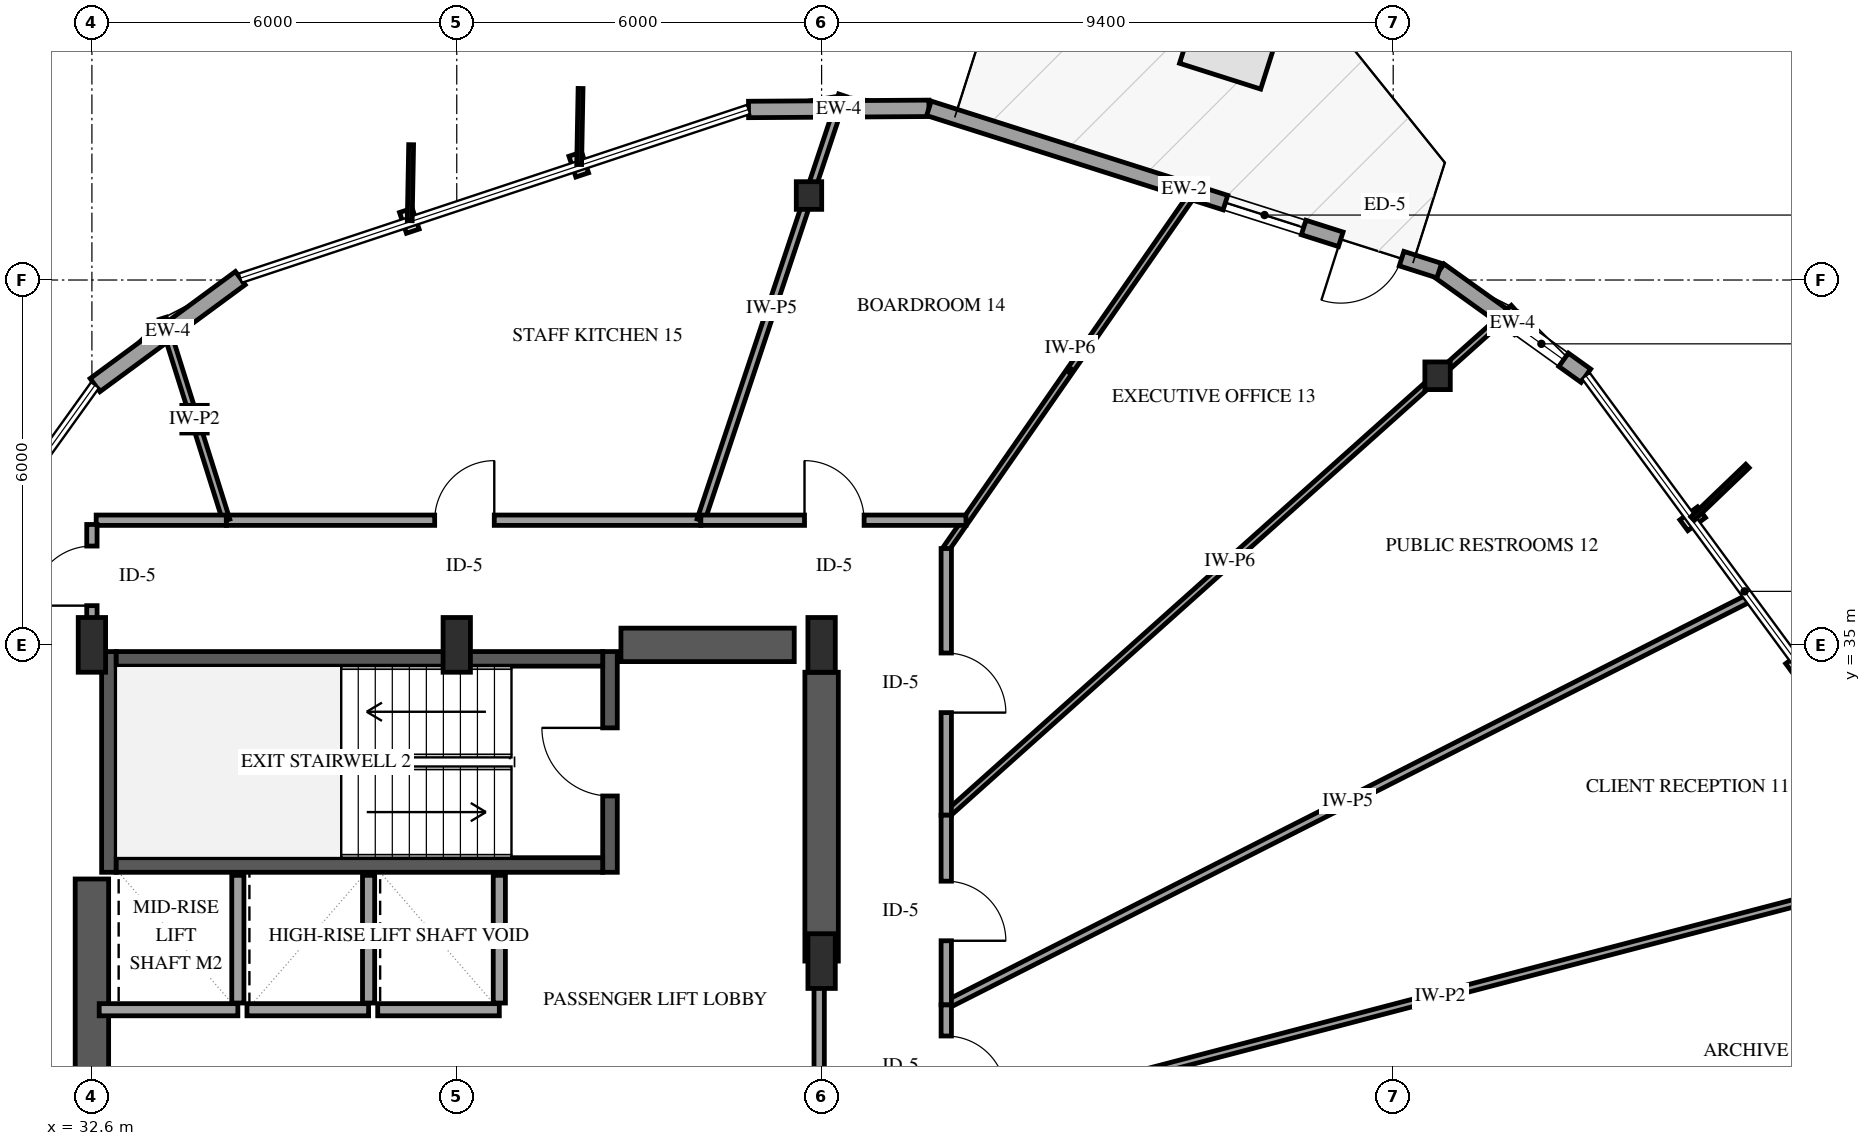
"""IFC4 building model, lengths in metres.
Left out: names, types, materials, properties, quantities, classifications, styles, units other than length and angle.
Written with IfcOpenShell. Run it as: python <this file> out.ifc"""

import sys

from ifc_helpers import new_model, si_unit, direction, frame, frame_2d, origin, origin_2d, place, context, subcontext, project, spatial, rectangle, i_section, extrude, element, fill, save


model = new_model("IFC4")
c1 = context("Model", 3, precision=1e-05, world=origin(), true_north=direction((0.0, 1.0)))
c2 = subcontext(c1, "Body", "Model", "MODEL_VIEW")
j1 = project(units=[si_unit("LENGTHUNIT", "METRE"), si_unit("PLANEANGLEUNIT", "RADIAN")], contexts=[c1])
p1 = place(None, origin())
s1 = spatial("IfcSite", under=j1, at=p1, CompositionType="ELEMENT")
p2 = place(p1, origin())
s2 = spatial("IfcBuilding", under=s1, at=p2, CompositionType="ELEMENT")
p3 = place(p2, frame((0.0, 0.0, 99.1)))
s3 = spatial("IfcBuildingStorey", under=s2, at=p3, CompositionType="ELEMENT", Elevation=99.1)
p4 = place(p3, frame((32.88, 31.26, 0.0), z_axis=(0.0, 0.0, 1.0), x_axis=(0.0, 1.0, 0.0)))
e1 = element("IfcWall", 1, at=p4, inside=s3, PredefinedType="SHEAR", context=c2, shape_type="SweptSolid", body=[
    extrude(rectangle(XDim=3.63, YDim=0.24, at=frame_2d((1.815, 0.0))), origin(), (0.0, 0.0, 1.0), 3.9),
])
p5 = place(p3, frame((41.12, 31.26, 0.0), z_axis=(0.0, 0.0, 1.0), x_axis=(0.0, 1.0, 0.0)))
e2 = element("IfcWall", 2, at=p5, inside=s3, PredefinedType="SHEAR", context=c2, shape_type="SweptSolid", body=[
    extrude(rectangle(XDim=3.63, YDim=0.24, at=frame_2d((1.815, 0.0))), origin(), (0.0, 0.0, 1.0), 3.9),
])
p6 = place(p5, frame((1.255, 0.0, 0.0)))
e3 = element("IfcOpeningElement", 3, at=p6, cuts=e2, PredefinedType="OPENING", context=c2, shape_type="SweptSolid", body=[
    extrude(rectangle(XDim=1.12, YDim=2.15, at=frame_2d((0.56, 1.075))), frame((0.0, 0.13, 0.0), z_axis=(0.0, -1.0, 0.0), x_axis=(1.0, 0.0, 0.0)), (0.0, 0.0, 1.0), 0.26),
])
for number, where, z_axis, x_axis in (
    (4, (33.0, 31.38, 0.0), (0.0, 0.0, 1.0), (1.0, 0.0, 0.0)),
    (5, (33.0, 34.77, 0.0), (0.0, 0.0, 1.0), (1.0, 0.0, 0.0)),
):
    element("IfcWall", number, at=place(p3, frame(where, z_axis=z_axis, x_axis=x_axis)), inside=s3, PredefinedType="SHEAR", context=c2, shape_type="SweptSolid", body=[
        extrude(rectangle(XDim=8.0, YDim=0.24, at=frame_2d((4.0, 0.0))), origin(), (0.0, 0.0, 1.0), 3.9),
    ])
p7 = place(p3, frame((32.6, 18.85, 0.0), z_axis=(0.0, 0.0, 1.0), x_axis=(0.0, 1.0, 0.0)))
e6 = element("IfcWall", 6, at=p7, inside=s3, PredefinedType="SHEAR", context=c2, shape_type="SweptSolid", body=[
    extrude(rectangle(XDim=12.3, YDim=0.55, at=frame_2d((6.15, 0.0))), origin(), (0.0, 0.0, 1.0), 3.9),
])
p8 = place(p3, frame((41.3, 35.0, 0.0), z_axis=(0.0, 0.0, 1.0), x_axis=(1.0, 0.0, 0.0)))
e7 = element("IfcWall", 7, at=p8, inside=s3, PredefinedType="SHEAR", context=c2, shape_type="SweptSolid", body=[
    extrude(rectangle(XDim=2.85, YDim=0.55, at=frame_2d((1.425, 0.0))), origin(), (0.0, 0.0, 1.0), 3.9),
])
p9 = place(p3, frame((44.6, 29.8, 0.0), z_axis=(0.0, 0.0, 1.0), x_axis=(0.0, 1.0, 0.0)))
e8 = element("IfcWall", 8, at=p9, inside=s3, PredefinedType="SHEAR", context=c2, shape_type="SweptSolid", body=[
    extrude(rectangle(XDim=4.75, YDim=0.55, at=frame_2d((2.375, 0.0))), origin(), (0.0, 0.0, 1.0), 3.9),
])
for number, where, z_axis, x_axis in (
    (9, (32.6, 35.0, 0.0), (0.0, 0.0, 1.0), (1.0, 0.0, 0.0)),
    (10, (38.6, 35.0, 0.0), (0.0, 0.0, 1.0), (1.0, 0.0, 0.0)),
    (11, (44.6, 29.8, 0.0), (0.0, 0.0, 1.0), (1.0, 0.0, 0.0)),
    (12, (44.6, 35.0, 0.0), (0.0, 0.0, 1.0), (1.0, 0.0, 0.0)),
):
    element("IfcColumn", number, at=place(p3, frame(where, z_axis=z_axis, x_axis=x_axis)), inside=s3, PredefinedType="PILASTER", context=c2, shape_type="SweptSolid", body=[
        extrude(rectangle(XDim=0.45, YDim=0.9, at=origin_2d()), origin(), (0.0, 0.0, 1.0), 3.9),
    ])
for number, where, z_axis, x_axis in (
    (13, (54.73, 39.425, 0.0), (0.0, 0.0, 1.0), (1.0, 0.0, 0.0)),
    (14, (44.393, 42.389, 0.0), (0.0, 0.0, 1.0), (1.0, 0.0, 0.0)),
    (15, (34.288, 38.711, 0.0), (0.0, 0.0, 1.0), (1.0, 0.0, 0.0)),
):
    element("IfcColumn", number, at=place(p3, frame(where, z_axis=z_axis, x_axis=x_axis)), inside=s3, PredefinedType="COLUMN", context=c2, shape_type="SweptSolid", body=[
        extrude(i_section(OverallWidth=0.418, OverallDepth=0.455, WebThickness=0.042, FlangeThickness=0.068, FilletRadius=0.038, at=origin_2d()), origin(), (0.0, 0.0, 1.0), 3.9),
    ])
p10 = place(p3, frame((57.168, 39.426, 0.0), z_axis=(0.0, 0.0, 1.0), x_axis=(-0.81270345811, 0.582677517308, 0.0)))
e16 = element("IfcWall", 16, at=p10, inside=s3, PredefinedType="SOLIDWALL", context=c2, shape_type="SweptSolid", body=[
    extrude(rectangle(XDim=2.967, YDim=0.27, at=frame_2d((1.483, 0.0))), origin(), (0.0, 0.0, 1.0), 2.979),
])
p11 = place(p10, frame((0.45, 0.0, 0.75)))
e17 = element("IfcOpeningElement", 17, at=p11, cuts=e16, PredefinedType="OPENING", context=c2, shape_type="SweptSolid", body=[
    extrude(rectangle(XDim=0.9, YDim=1.5, at=frame_2d((0.45, 0.75))), frame((0.0, 0.145, 0.0), z_axis=(0.0, -1.0, 0.0), x_axis=(1.0, 0.0, 0.0)), (0.0, 0.0, 1.0), 0.29),
])
p12 = place(p3, frame((46.365, 43.823, 0.0), z_axis=(0.0, 0.0, 1.0), x_axis=(-0.99998044038, -0.00625450691, 0.0)))
e18 = element("IfcWall", 18, at=p12, inside=s3, PredefinedType="SOLIDWALL", context=c2, shape_type="SweptSolid", body=[
    extrude(rectangle(XDim=2.967, YDim=0.27, at=frame_2d((1.483, 0.0))), origin(), (0.0, 0.0, 1.0), 2.979),
])
p13 = place(p3, frame((54.758, 41.155, 0.0), z_axis=(0.0, 0.0, 1.0), x_axis=(-0.952980376886, 0.303032013607, 0.0)))
e19 = element("IfcWall", 19, at=p13, inside=s3, PredefinedType="SOLIDWALL", context=c2, shape_type="SweptSolid", body=[
    extrude(rectangle(XDim=8.807, YDim=0.25, at=frame_2d((4.403, 0.0))), origin(), (0.0, 0.0, 1.0), 2.979),
])
p14 = place(p13, frame((0.65, 0.0, 0.0)))
e20 = element("IfcOpeningElement", 20, at=p14, cuts=e19, PredefinedType="OPENING", context=c2, shape_type="SweptSolid", body=[
    extrude(rectangle(XDim=1.05, YDim=2.15, at=frame_2d((0.525, 1.075))), frame((0.0, 0.135, 0.0), z_axis=(0.0, -1.0, 0.0), x_axis=(1.0, 0.0, 0.0)), (0.0, 0.0, 1.0), 0.27),
])
p15 = place(p13, frame((2.34, 0.0, 0.72)))
e21 = element("IfcOpeningElement", 21, at=p15, cuts=e19, PredefinedType="OPENING", context=c2, shape_type="SweptSolid", body=[
    extrude(rectangle(XDim=1.35, YDim=1.65, at=frame_2d((0.675, 0.825))), frame((0.0, 0.135, 0.0), z_axis=(0.0, -1.0, 0.0), x_axis=(1.0, 0.0, 0.0)), (0.0, 0.0, 1.0), 0.27),
])
p16 = place(p3, frame((35.04, 41.031, 0.0), z_axis=(0.0, 0.0, 1.0), x_axis=(-0.80529158798, -0.592878957569, 0.0)))
e22 = element("IfcWall", 22, at=p16, inside=s3, PredefinedType="SOLIDWALL", context=c2, shape_type="SweptSolid", body=[
    extrude(rectangle(XDim=2.967, YDim=0.27, at=frame_2d((1.483, 0.0))), origin(), (0.0, 0.0, 1.0), 2.979),
])
p17 = place(p3, frame((32.72, 29.0, 0.0), z_axis=(0.0, 0.0, 1.0), x_axis=(1.0, 0.0, 0.0)))
e23 = element("IfcWall", 23, at=p17, inside=s3, PredefinedType="SOLIDWALL", context=c2, shape_type="SweptSolid", body=[
    extrude(rectangle(XDim=2.28, YDim=0.2, at=frame_2d((1.14, 0.0))), origin(), (0.0, 0.0, 1.0), 3.6),
])
p18 = place(p3, frame((35.0, 29.11, 0.0), z_axis=(0.0, 0.0, 1.0), x_axis=(0.0, 1.0, 0.0)))
e24 = element("IfcWall", 24, at=p18, inside=s3, PredefinedType="SOLIDWALL", context=c2, shape_type="SweptSolid", body=[
    extrude(rectangle(XDim=2.1, YDim=0.2, at=frame_2d((1.05, 0.0))), origin(), (0.0, 0.0, 1.0), 3.6),
])
p19 = place(p3, frame((35.15, 29.0, 0.0), z_axis=(0.0, 0.0, 1.0), x_axis=(1.0, 0.0, 0.0)))
e25 = element("IfcWall", 25, at=p19, inside=s3, PredefinedType="SOLIDWALL", context=c2, shape_type="SweptSolid", body=[
    extrude(rectangle(XDim=2.0, YDim=0.2, at=frame_2d((1.0, 0.0))), origin(), (0.0, 0.0, 1.0), 3.6),
])
p20 = place(p3, frame((37.15, 29.11, 0.0), z_axis=(0.0, 0.0, 1.0), x_axis=(0.0, 1.0, 0.0)))
e26 = element("IfcWall", 26, at=p20, inside=s3, PredefinedType="SOLIDWALL", context=c2, shape_type="SweptSolid", body=[
    extrude(rectangle(XDim=2.1, YDim=0.2, at=frame_2d((1.05, 0.0))), origin(), (0.0, 0.0, 1.0), 3.6),
])
p21 = place(p3, frame((37.3, 29.0, 0.0), z_axis=(0.0, 0.0, 1.0), x_axis=(1.0, 0.0, 0.0)))
e27 = element("IfcWall", 27, at=p21, inside=s3, PredefinedType="SOLIDWALL", context=c2, shape_type="SweptSolid", body=[
    extrude(rectangle(XDim=2.0, YDim=0.2, at=frame_2d((1.0, 0.0))), origin(), (0.0, 0.0, 1.0), 3.6),
])
p22 = place(p3, frame((39.3, 29.11, 0.0), z_axis=(0.0, 0.0, 1.0), x_axis=(0.0, 1.0, 0.0)))
e28 = element("IfcWall", 28, at=p22, inside=s3, PredefinedType="SOLIDWALL", context=c2, shape_type="SweptSolid", body=[
    extrude(rectangle(XDim=2.1, YDim=0.2, at=frame_2d((1.05, 0.0))), origin(), (0.0, 0.0, 1.0), 3.6),
])
p23 = place(p3, frame((46.65, 27.106, 0.0), z_axis=(0.0, 0.0, 1.0), x_axis=(0.967458365638, 0.253030256606, 0.0)))
e29 = element("IfcWall", 29, at=p23, inside=s3, PredefinedType="PARTITIONING", context=c2, shape_type="SweptSolid", body=[
    extrude(rectangle(XDim=16.792, YDim=0.12, at=frame_2d((8.396, 0.0))), origin(), (0.0, 0.0, 1.0), 2.895),
])
p24 = place(p3, frame((46.65, 29.079, 0.0), z_axis=(0.0, 0.0, 1.0), x_axis=(0.891987023653, 0.452061002117, 0.0)))
e30 = element("IfcWall", 30, at=p24, inside=s3, PredefinedType="PARTITIONING", context=c2, shape_type="SweptSolid", body=[
    extrude(rectangle(XDim=14.807, YDim=0.13, at=frame_2d((7.404, 0.0))), origin(), (0.0, 0.0, 1.0), 3.6),
])
p25 = place(p3, frame((46.65, 32.199, 0.0), z_axis=(0.0, 0.0, 1.0), x_axis=(0.745403019973, 0.666614084621, 0.0)))
e31 = element("IfcWall", 31, at=p25, inside=s3, PredefinedType="PARTITIONING", context=c2, shape_type="SweptSolid", body=[
    extrude(rectangle(XDim=12.516, YDim=0.11, at=frame_2d((6.258, 0.0))), origin(), (0.0, 0.0, 1.0), 2.978),
])
p26 = place(p3, frame((34.81, 37.05, 0.0), z_axis=(0.0, 0.0, 1.0), x_axis=(1.0, 0.0, 0.0)))
e32 = element("IfcWall", 32, at=p26, inside=s3, PredefinedType="PARTITIONING", context=c2, shape_type="SweptSolid", body=[
    extrude(rectangle(XDim=7.804, YDim=0.17, at=frame_2d((3.902, 0.0))), origin(), (0.0, 0.0, 1.0), 3.6),
])
p27 = place(p26, frame((3.427, 0.0, 0.0)))
e33 = element("IfcOpeningElement", 33, at=p27, cuts=e32, PredefinedType="OPENING", context=c2, shape_type="SweptSolid", body=[
    extrude(rectangle(XDim=0.98, YDim=2.15, at=frame_2d((0.49, 1.075))), frame((0.0, 0.095, 0.0), z_axis=(0.0, -1.0, 0.0), x_axis=(1.0, 0.0, 0.0)), (0.0, 0.0, 1.0), 0.19),
])
p28 = place(p3, frame((42.614, 37.05, 0.0), z_axis=(0.0, 0.0, 1.0), x_axis=(0.316009020376, 0.948756185245, 0.0)))
e34 = element("IfcWall", 34, at=p28, inside=s3, PredefinedType="PARTITIONING", context=c2, shape_type="SweptSolid", body=[
    extrude(rectangle(XDim=7.366, YDim=0.13, at=frame_2d((3.683, 0.0))), origin(), (0.0, 0.0, 1.0), 2.895),
])
p29 = place(p3, frame((46.65, 36.584, 0.0), z_axis=(0.0, 0.0, 1.0), x_axis=(0.570692229292, 0.821164039292, 0.0)))
e35 = element("IfcWall", 35, at=p29, inside=s3, PredefinedType="PARTITIONING", context=c2, shape_type="SweptSolid", body=[
    extrude(rectangle(XDim=7.13, YDim=0.11, at=frame_2d((3.565, 0.0))), origin(), (0.0, 0.0, 1.0), 2.974),
])
p30 = place(p3, frame((44.56, 29.8, 0.0), z_axis=(0.0, 0.0, 1.0), x_axis=(0.0, -1.0, 0.0)))
e36 = element("IfcWall", 36, at=p30, inside=s3, PredefinedType="PARTITIONING", context=c2, shape_type="SweptSolid", body=[
    extrude(rectangle(XDim=6.91, YDim=0.17, at=frame_2d((3.455, 0.0))), origin(), (0.0, 0.0, 1.0), 2.64),
])
p31 = place(p30, frame((2.915, 0.0, 0.0)))
e37 = element("IfcOpeningElement", 37, at=p31, cuts=e36, PredefinedType="OPENING", context=c2, shape_type="SweptSolid", body=[
    extrude(rectangle(XDim=1.08, YDim=2.15, at=frame_2d((0.54, 1.075))), frame((0.0, 0.095, 0.0), z_axis=(0.0, -1.0, 0.0), x_axis=(1.0, 0.0, 0.0)), (0.0, 0.0, 1.0), 0.19),
])
p32 = place(p3, frame((46.65, 36.584, 0.0), z_axis=(0.0, 0.0, 1.0), x_axis=(0.0, -1.0, 0.0)))
e38 = element("IfcWall", 38, at=p32, inside=s3, PredefinedType="PARTITIONING", context=c2, shape_type="SweptSolid", body=[
    extrude(rectangle(XDim=4.385, YDim=0.17, at=frame_2d((2.192, 0.0))), origin(), (0.0, 0.0, 1.0), 3.6),
])
p33 = place(p32, frame((1.718, 0.0, 0.0)))
e39 = element("IfcOpeningElement", 39, at=p33, cuts=e38, PredefinedType="OPENING", context=c2, shape_type="SweptSolid", body=[
    extrude(rectangle(XDim=0.98, YDim=2.15, at=frame_2d((0.49, 1.075))), frame((0.0, 0.095, 0.0), z_axis=(0.0, -1.0, 0.0), x_axis=(1.0, 0.0, 0.0)), (0.0, 0.0, 1.0), 0.19),
])
p34 = place(p3, frame((42.614, 37.05, 0.0), z_axis=(0.0, 0.0, 1.0), x_axis=(1.0, 0.0, 0.0)))
e40 = element("IfcWall", 40, at=p34, inside=s3, PredefinedType="PARTITIONING", context=c2, shape_type="SweptSolid", body=[
    extrude(rectangle(XDim=4.36, YDim=0.17, at=frame_2d((2.18, 0.0))), origin(), (0.0, 0.0, 1.0), 3.6),
])
p35 = place(p34, frame((1.705, 0.0, 0.0)))
e41 = element("IfcOpeningElement", 41, at=p35, cuts=e40, PredefinedType="OPENING", context=c2, shape_type="SweptSolid", body=[
    extrude(rectangle(XDim=0.98, YDim=2.15, at=frame_2d((0.49, 1.075))), frame((0.0, 0.095, 0.0), z_axis=(0.0, -1.0, 0.0), x_axis=(1.0, 0.0, 0.0)), (0.0, 0.0, 1.0), 0.19),
])
p36 = place(p3, frame((34.81, 37.05, 0.0), z_axis=(0.0, 0.0, 1.0), x_axis=(-0.300194900444, 0.953877886182, 0.0)))
e42 = element("IfcWall", 42, at=p36, inside=s3, PredefinedType="PARTITIONING", context=c2, shape_type="SweptSolid", body=[
    extrude(rectangle(XDim=3.482, YDim=0.12, at=frame_2d((1.741, 0.0))), origin(), (0.0, 0.0, 1.0), 2.895),
])
p37 = place(p3, frame((46.65, 32.199, 0.0), z_axis=(0.0, 0.0, 1.0), x_axis=(0.0, -1.0, 0.0)))
e43 = element("IfcWall", 43, at=p37, inside=s3, PredefinedType="PARTITIONING", context=c2, shape_type="SweptSolid", body=[
    extrude(rectangle(XDim=3.12, YDim=0.17, at=frame_2d((1.56, 0.0))), origin(), (0.0, 0.0, 1.0), 3.6),
])
p38 = place(p37, frame((1.085, 0.0, 0.0)))
e44 = element("IfcOpeningElement", 44, at=p38, cuts=e43, PredefinedType="OPENING", context=c2, shape_type="SweptSolid", body=[
    extrude(rectangle(XDim=0.98, YDim=2.15, at=frame_2d((0.49, 1.075))), frame((0.0, 0.095, 0.0), z_axis=(0.0, -1.0, 0.0), x_axis=(1.0, 0.0, 0.0)), (0.0, 0.0, 1.0), 0.19),
])
p39 = place(p3, frame((32.67, 37.05, 0.0), z_axis=(0.0, 0.0, 1.0), x_axis=(1.0, 0.0, 0.0)))
e45 = element("IfcWall", 45, at=p39, inside=s3, PredefinedType="PARTITIONING", context=c2, shape_type="SweptSolid", body=[
    extrude(rectangle(XDim=2.14, YDim=0.17, at=frame_2d((1.07, 0.0))), origin(), (0.0, 0.0, 1.0), 3.6),
])
p40 = place(p3, frame((46.65, 29.079, 0.0), z_axis=(0.0, 0.0, 1.0), x_axis=(0.0, -1.0, 0.0)))
e46 = element("IfcWall", 46, at=p40, inside=s3, PredefinedType="PARTITIONING", context=c2, shape_type="SweptSolid", body=[
    extrude(rectangle(XDim=1.973, YDim=0.17, at=frame_2d((0.987, 0.0))), origin(), (0.0, 0.0, 1.0), 3.6),
])
p41 = place(p40, frame((0.511, 0.0, 0.0)))
e47 = element("IfcOpeningElement", 47, at=p41, cuts=e46, PredefinedType="OPENING", context=c2, shape_type="SweptSolid", body=[
    extrude(rectangle(XDim=0.98, YDim=2.15, at=frame_2d((0.49, 1.075))), frame((0.0, 0.095, 0.0), z_axis=(0.0, -1.0, 0.0), x_axis=(1.0, 0.0, 0.0)), (0.0, 0.0, 1.0), 0.19),
])
p42 = place(p3, frame((32.6, 35.07, 0.0), z_axis=(0.0, 0.0, 1.0), x_axis=(0.0, 1.0, 0.0)))
e48 = element("IfcWall", 48, at=p42, inside=s3, PredefinedType="PARTITIONING", context=c2, shape_type="SweptSolid", body=[
    extrude(rectangle(XDim=1.91, YDim=0.17, at=frame_2d((0.955, 0.0))), origin(), (0.0, 0.0, 1.0), 3.6),
])
p43 = place(p42, frame((0.575, 0.0, 0.0)))
e49 = element("IfcOpeningElement", 49, at=p43, cuts=e48, PredefinedType="OPENING", context=c2, shape_type="SweptSolid", body=[
    extrude(rectangle(XDim=0.98, YDim=2.15, at=frame_2d((0.49, 1.075))), frame((0.0, 0.095, 0.0), z_axis=(0.0, -1.0, 0.0), x_axis=(1.0, 0.0, 0.0)), (0.0, 0.0, 1.0), 0.19),
])
p44 = place(p11, origin())
e50 = element("IfcWindow", 50, at=p44, inside=s3, PartitioningType="SINGLE_PANEL", PredefinedType="WINDOW", context=c2, shape_type="SweptSolid", body=[
    extrude(rectangle(XDim=0.9, YDim=1.5, at=frame_2d((0.45, 0.75))), frame((0.0, 0.03, 0.0), z_axis=(0.0, -1.0, 0.0), x_axis=(1.0, 0.0, 0.0)), (0.0, 0.0, 1.0), 0.06),
])
fill(e17, e50)
p45 = place(p14, origin())
e51 = element("IfcDoor", 51, at=p45, inside=s3, OperationType="SINGLE_SWING_RIGHT", PredefinedType="DOOR", context=c2, shape_type="SweptSolid", body=[
    extrude(rectangle(XDim=1.05, YDim=2.15, at=frame_2d((0.525, 1.075))), frame((0.0, 0.025, 0.0), z_axis=(0.0, -1.0, 0.0), x_axis=(1.0, 0.0, 0.0)), (0.0, 0.0, 1.0), 0.05),
])
fill(e20, e51)
p46 = place(p15, origin())
e52 = element("IfcWindow", 52, at=p46, inside=s3, PartitioningType="SINGLE_PANEL", PredefinedType="WINDOW", context=c2, shape_type="SweptSolid", body=[
    extrude(rectangle(XDim=1.35, YDim=1.65, at=frame_2d((0.675, 0.825))), frame((0.0, 0.03, 0.0), z_axis=(0.0, -1.0, 0.0), x_axis=(1.0, 0.0, 0.0)), (0.0, 0.0, 1.0), 0.06),
])
fill(e21, e52)
p47 = place(p6, origin())
e53 = element("IfcDoor", 53, at=p47, inside=s3, OperationType="SINGLE_SWING_RIGHT", PredefinedType="DOOR", context=c2, shape_type="SweptSolid", body=[
    extrude(rectangle(XDim=1.12, YDim=2.15, at=frame_2d((0.56, 1.075))), frame((0.0, 0.025, 0.0), z_axis=(0.0, -1.0, 0.0), x_axis=(1.0, 0.0, 0.0)), (0.0, 0.0, 1.0), 0.05),
])
fill(e3, e53)
p48 = place(p27, origin())
e54 = element("IfcDoor", 54, at=p48, inside=s3, OperationType="SINGLE_SWING_RIGHT", PredefinedType="DOOR", context=c2, shape_type="SweptSolid", body=[
    extrude(rectangle(XDim=0.98, YDim=2.15, at=frame_2d((0.49, 1.075))), frame((0.0, 0.025, 0.0), z_axis=(0.0, -1.0, 0.0), x_axis=(1.0, 0.0, 0.0)), (0.0, 0.0, 1.0), 0.05),
])
fill(e33, e54)
p49 = place(p33, origin())
e55 = element("IfcDoor", 55, at=p49, inside=s3, OperationType="SINGLE_SWING_RIGHT", PredefinedType="DOOR", context=c2, shape_type="SweptSolid", body=[
    extrude(rectangle(XDim=0.98, YDim=2.15, at=frame_2d((0.49, 1.075))), frame((0.0, 0.025, 0.0), z_axis=(0.0, -1.0, 0.0), x_axis=(1.0, 0.0, 0.0)), (0.0, 0.0, 1.0), 0.05),
])
fill(e39, e55)
p50 = place(p35, origin())
e56 = element("IfcDoor", 56, at=p50, inside=s3, OperationType="SINGLE_SWING_LEFT", PredefinedType="DOOR", context=c2, shape_type="SweptSolid", body=[
    extrude(rectangle(XDim=0.98, YDim=2.15, at=frame_2d((0.49, 1.075))), frame((0.0, 0.025, 0.0), z_axis=(0.0, -1.0, 0.0), x_axis=(1.0, 0.0, 0.0)), (0.0, 0.0, 1.0), 0.05),
])
fill(e41, e56)
p51 = place(p38, origin())
e57 = element("IfcDoor", 57, at=p51, inside=s3, OperationType="SINGLE_SWING_RIGHT", PredefinedType="DOOR", context=c2, shape_type="SweptSolid", body=[
    extrude(rectangle(XDim=0.98, YDim=2.15, at=frame_2d((0.49, 1.075))), frame((0.0, 0.025, 0.0), z_axis=(0.0, -1.0, 0.0), x_axis=(1.0, 0.0, 0.0)), (0.0, 0.0, 1.0), 0.05),
])
fill(e44, e57)
p52 = place(p41, origin())
e58 = element("IfcDoor", 58, at=p52, inside=s3, OperationType="SINGLE_SWING_RIGHT", PredefinedType="DOOR", context=c2, shape_type="SweptSolid", body=[
    extrude(rectangle(XDim=0.98, YDim=2.15, at=frame_2d((0.49, 1.075))), frame((0.0, 0.025, 0.0), z_axis=(0.0, -1.0, 0.0), x_axis=(1.0, 0.0, 0.0)), (0.0, 0.0, 1.0), 0.05),
])
fill(e47, e58)
p53 = place(p43, origin())
e59 = element("IfcDoor", 59, at=p53, inside=s3, OperationType="SINGLE_SWING_LEFT", PredefinedType="DOOR", context=c2, shape_type="SweptSolid", body=[
    extrude(rectangle(XDim=0.98, YDim=2.15, at=frame_2d((0.49, 1.075))), frame((0.0, 0.025, 0.0), z_axis=(0.0, -1.0, 0.0), x_axis=(1.0, 0.0, 0.0)), (0.0, 0.0, 1.0), 0.05),
])
fill(e49, e59)
save(model, sys.argv[1])
